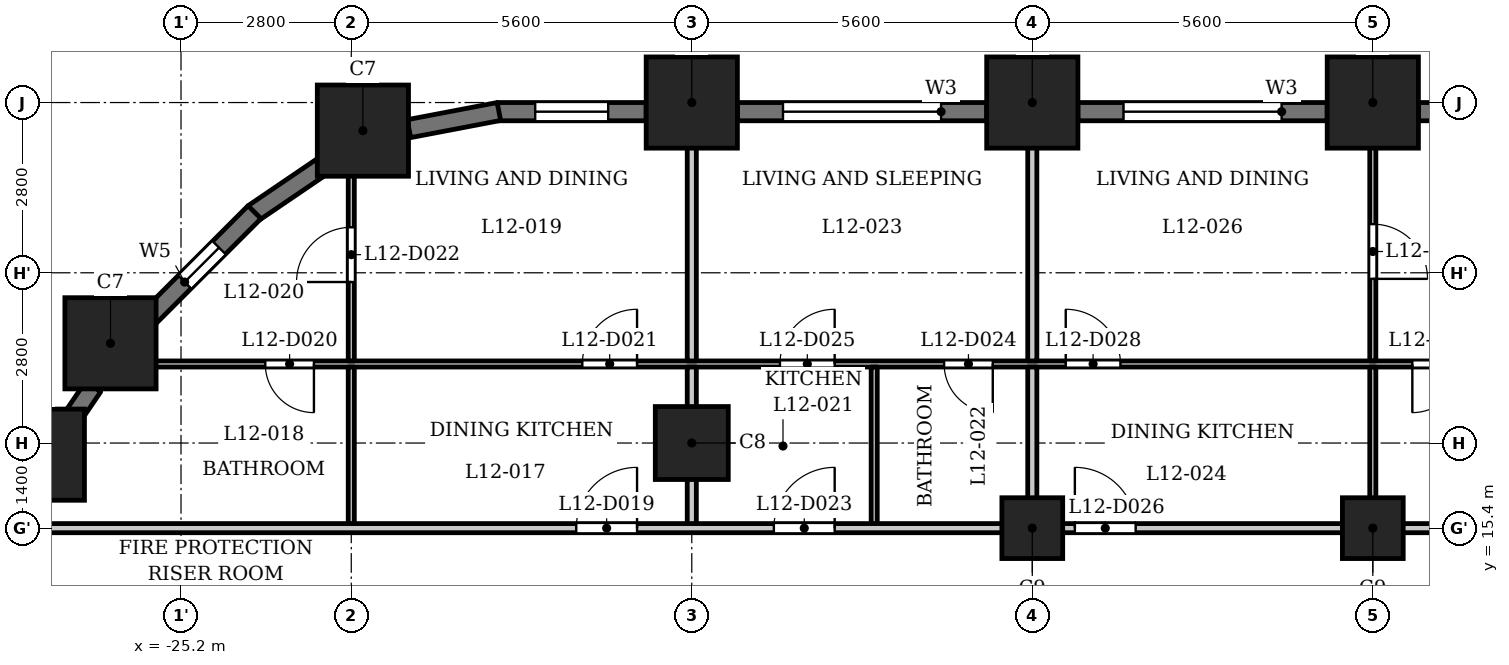
"""IFC4 building model, lengths in metres.
Left out: names, types, materials, properties, quantities, classifications, styles, units other than length and angle.
Written with IfcOpenShell. Run it as: python <this file> out.ifc"""

import sys

from ifc_helpers import new_model, si_unit, direction, frame, frame_2d, origin, origin_2d, place, context, subcontext, project, spatial, rectangle, extrude, element, fill, save


model = new_model("IFC4")
c1 = context("Model", 3, precision=1e-05, world=origin(), true_north=direction((0.0, 1.0)))
c2 = subcontext(c1, "Body", "Model", "MODEL_VIEW")
j1 = project(units=[si_unit("LENGTHUNIT", "METRE"), si_unit("PLANEANGLEUNIT", "RADIAN")], contexts=[c1])
p1 = place(None, origin())
s1 = spatial("IfcSite", under=j1, at=p1, CompositionType="ELEMENT")
p2 = place(p1, origin())
s2 = spatial("IfcBuilding", under=s1, at=p2, CompositionType="ELEMENT")
p3 = place(p2, frame((0.0, 0.0, 51.5)))
s3 = spatial("IfcBuildingStorey", under=s2, at=p3, CompositionType="ELEMENT", Elevation=51.5)
for number, where, z_axis, x_axis in (
    (1, (-5.6, 22.4, 0.0), (0.0, 0.0, 1.0), (1.0, 0.0, 0.0)),
    (2, (-11.2, 22.4, 0.0), (0.0, 0.0, 1.0), (1.0, 0.0, 0.0)),
    (3, (-16.8, 22.4, 0.0), (0.0, 0.0, 1.0), (1.0, 0.0, 0.0)),
    (4, (-22.209, 21.938, 0.0), (0.0, 0.0, 1.0), (1.0, 0.0, 0.0)),
    (5, (-26.36, 18.44, 0.0), (0.0, 0.0, 1.0), (1.0, 0.0, 0.0)),
    (6, (-27.538, 16.609, 0.0), (0.0, 0.0, 1.0), (1.0, 0.0, 0.0)),
):
    element("IfcColumn", number, at=place(p3, frame(where, z_axis=z_axis, x_axis=x_axis)), inside=s3, PredefinedType="COLUMN", context=c2, shape_type="SweptSolid", body=[
        extrude(rectangle(XDim=1.5, YDim=1.5, at=origin_2d()), origin(), (0.0, 0.0, 1.0), 3.5),
    ])
p4 = place(p3, frame((-16.8, 16.8, 0.0), z_axis=(0.0, 0.0, 1.0), x_axis=(1.0, 0.0, 0.0)))
e7 = element("IfcColumn", 7, at=p4, inside=s3, PredefinedType="COLUMN", context=c2, shape_type="SweptSolid", body=[
    extrude(rectangle(XDim=1.2, YDim=1.2, at=origin_2d()), origin(), (0.0, 0.0, 1.0), 3.5),
])
for number, where, z_axis, x_axis in (
    (8, (-11.2, 15.4, 0.0), (0.0, 0.0, 1.0), (1.0, 0.0, 0.0)),
    (9, (-5.6, 15.4, 0.0), (0.0, 0.0, 1.0), (1.0, 0.0, 0.0)),
):
    element("IfcColumn", number, at=place(p3, frame(where, z_axis=z_axis, x_axis=x_axis)), inside=s3, PredefinedType="COLUMN", context=c2, shape_type="SweptSolid", body=[
        extrude(rectangle(XDim=1.0, YDim=1.0, at=origin_2d()), origin(), (0.0, 0.0, 1.0), 3.5),
    ])
p5 = place(p3, frame((-0.75, 22.25, 0.0), z_axis=(0.0, 0.0, 1.0), x_axis=(-1.0, 0.0, 0.0)))
e10 = element("IfcWall", 10, at=p5, inside=s3, PredefinedType="SOLIDWALL", context=c2, shape_type="SweptSolid", body=[
    extrude(rectangle(XDim=4.1, YDim=0.3, at=frame_2d((2.05, 0.0))), origin(), (0.0, 0.0, 1.0), 2.35),
])
p6 = place(p5, frame((0.25, 0.0, 1.2)))
e11 = element("IfcOpeningElement", 11, at=p6, cuts=e10, PredefinedType="OPENING", context=c2, shape_type="SweptSolid", body=[
    extrude(rectangle(XDim=3.6, YDim=0.95, at=frame_2d((1.8, 0.475))), frame((0.0, 0.16, 0.0), z_axis=(0.0, -1.0, 0.0), x_axis=(1.0, 0.0, 0.0)), (0.0, 0.0, 1.0), 0.32),
])
p7 = place(p3, frame((-6.35, 22.25, 0.0), z_axis=(0.0, 0.0, 1.0), x_axis=(-1.0, 0.0, 0.0)))
e12 = element("IfcWall", 12, at=p7, inside=s3, PredefinedType="SOLIDWALL", context=c2, shape_type="SweptSolid", body=[
    extrude(rectangle(XDim=4.1, YDim=0.3, at=frame_2d((2.05, 0.0))), origin(), (0.0, 0.0, 1.0), 2.35),
])
p8 = place(p7, frame((0.75, 0.0, 0.9)))
e13 = element("IfcOpeningElement", 13, at=p8, cuts=e12, PredefinedType="OPENING", context=c2, shape_type="SweptSolid", body=[
    extrude(rectangle(XDim=2.6, YDim=1.25, at=frame_2d((1.3, 0.625))), frame((0.0, 0.16, 0.0), z_axis=(0.0, -1.0, 0.0), x_axis=(1.0, 0.0, 0.0)), (0.0, 0.0, 1.0), 0.32),
])
p9 = place(p3, frame((-11.95, 22.25, 0.0), z_axis=(0.0, 0.0, 1.0), x_axis=(-1.0, 0.0, 0.0)))
e14 = element("IfcWall", 14, at=p9, inside=s3, PredefinedType="SOLIDWALL", context=c2, shape_type="SweptSolid", body=[
    extrude(rectangle(XDim=4.1, YDim=0.3, at=frame_2d((2.05, 0.0))), origin(), (0.0, 0.0, 1.0), 2.35),
])
p10 = place(p9, frame((0.75, 0.0, 0.9)))
e15 = element("IfcOpeningElement", 15, at=p10, cuts=e14, PredefinedType="OPENING", context=c2, shape_type="SweptSolid", body=[
    extrude(rectangle(XDim=2.6, YDim=1.25, at=frame_2d((1.3, 0.625))), frame((0.0, 0.16, 0.0), z_axis=(0.0, -1.0, 0.0), x_axis=(1.0, 0.0, 0.0)), (0.0, 0.0, 1.0), 0.32),
])
p11 = place(p3, frame((-17.55, 22.25, 0.0), z_axis=(0.0, 0.0, 1.0), x_axis=(-1.0, 0.0, 0.0)))
e16 = element("IfcWall", 16, at=p11, inside=s3, PredefinedType="SOLIDWALL", context=c2, shape_type="SweptSolid", body=[
    extrude(rectangle(XDim=2.45, YDim=0.3, at=frame_2d((1.225, 0.0))), origin(), (0.0, 0.0, 1.0), 2.35),
])
p12 = place(p11, frame((0.625, 0.0, 0.6)))
e17 = element("IfcOpeningElement", 17, at=p12, cuts=e16, PredefinedType="OPENING", context=c2, shape_type="SweptSolid", body=[
    extrude(rectangle(XDim=1.2, YDim=1.55, at=frame_2d((0.6, 0.775))), frame((0.0, 0.16, 0.0), z_axis=(0.0, -1.0, 0.0), x_axis=(1.0, 0.0, 0.0)), (0.0, 0.0, 1.0), 0.32),
])
for number, where, z_axis, x_axis in (
    (18, (-19.972, 22.253, 0.0), (0.0, 0.0, 1.0), (-0.982, -0.187, 0.0)),
    (19, (-22.767, 21.426, 0.0), (0.0, 0.0, 1.0), (-0.827, -0.562, 0.0)),
):
    element("IfcWall", number, at=place(p3, frame(where, z_axis=z_axis, x_axis=x_axis)), inside=s3, PredefinedType="SOLIDWALL", context=c2, shape_type="SweptSolid", body=[
        extrude(rectangle(XDim=1.506, YDim=0.3, at=frame_2d((0.753, 0.0))), origin(), (0.0, 0.0, 1.0), 2.35),
    ])
p13 = place(p3, frame((-23.991, 20.597, 0.0), z_axis=(0.0, 0.0, 1.0), x_axis=(-0.707106781187, -0.707106781187, 0.0)))
e20 = element("IfcWall", 20, at=p13, inside=s3, PredefinedType="SOLIDWALL", context=c2, shape_type="SweptSolid", body=[
    extrude(rectangle(XDim=2.45, YDim=0.3, at=frame_2d((1.225, 0.0))), origin(), (0.0, 0.0, 1.0), 2.35),
])
p14 = place(p13, frame((0.825, 0.0, 0.6)))
e21 = element("IfcOpeningElement", 21, at=p14, cuts=e20, PredefinedType="OPENING", context=c2, shape_type="SweptSolid", body=[
    extrude(rectangle(XDim=0.8, YDim=1.55, at=frame_2d((0.4, 0.775))), frame((0.0, 0.16, 0.0), z_axis=(0.0, -1.0, 0.0), x_axis=(1.0, 0.0, 0.0)), (0.0, 0.0, 1.0), 0.32),
])
p15 = place(p3, frame((-26.645, 17.727, 0.0), z_axis=(0.0, 0.0, 1.0), x_axis=(-0.562083182981, -0.827080706709, 0.0)))
e22 = element("IfcWall", 22, at=p15, inside=s3, PredefinedType="SOLIDWALL", context=c2, shape_type="SweptSolid", body=[
    extrude(rectangle(XDim=0.677, YDim=0.3, at=frame_2d((0.339, 0.0))), origin(), (0.0, 0.0, 1.0), 3.2),
])
p16 = place(p3, frame((-27.484, 15.4, 0.0), z_axis=(0.0, 0.0, 1.0), x_axis=(1.0, 0.0, 0.0)))
e23 = element("IfcWall", 23, at=p16, inside=s3, PredefinedType="PARTITIONING", context=c2, shape_type="SweptSolid", body=[
    extrude(rectangle(XDim=54.968, YDim=0.15, at=frame_2d((27.484, 0.0))), origin(), (0.0, 0.0, 1.0), 3.2),
])
p17 = place(p16, frame((8.784, 0.0, 0.0)))
e24 = element("IfcOpeningElement", 24, at=p17, cuts=e23, PredefinedType="OPENING", context=c2, shape_type="SweptSolid", body=[
    extrude(rectangle(XDim=1.0, YDim=2.1, at=frame_2d((0.5, 1.05))), frame((0.0, 0.085, 0.0), z_axis=(0.0, -1.0, 0.0), x_axis=(1.0, 0.0, 0.0)), (0.0, 0.0, 1.0), 0.17),
])
p18 = place(p16, frame((12.034, 0.0, 0.0)))
e25 = element("IfcOpeningElement", 25, at=p18, cuts=e23, PredefinedType="OPENING", context=c2, shape_type="SweptSolid", body=[
    extrude(rectangle(XDim=1.0, YDim=2.1, at=frame_2d((0.5, 1.05))), frame((0.0, 0.085, 0.0), z_axis=(0.0, -1.0, 0.0), x_axis=(1.0, 0.0, 0.0)), (0.0, 0.0, 1.0), 0.17),
])
p19 = place(p16, frame((16.984, 0.0, 0.0)))
e26 = element("IfcOpeningElement", 26, at=p19, cuts=e23, PredefinedType="OPENING", context=c2, shape_type="SweptSolid", body=[
    extrude(rectangle(XDim=1.0, YDim=2.1, at=frame_2d((0.5, 1.05))), frame((0.0, 0.085, 0.0), z_axis=(0.0, -1.0, 0.0), x_axis=(1.0, 0.0, 0.0)), (0.0, 0.0, 1.0), 0.17),
])
p20 = place(p16, frame((28.184, 0.0, 0.0)))
e27 = element("IfcOpeningElement", 27, at=p20, cuts=e23, PredefinedType="OPENING", context=c2, shape_type="SweptSolid", body=[
    extrude(rectangle(XDim=1.0, YDim=2.1, at=frame_2d((0.5, 1.05))), frame((0.0, 0.085, 0.0), z_axis=(0.0, -1.0, 0.0), x_axis=(1.0, 0.0, 0.0)), (0.0, 0.0, 1.0), 0.17),
])
p21 = place(p16, frame((48.234, 0.0, 0.0)))
e28 = element("IfcOpeningElement", 28, at=p21, cuts=e23, PredefinedType="OPENING", context=c2, shape_type="SweptSolid", body=[
    extrude(rectangle(XDim=1.0, YDim=2.1, at=frame_2d((0.5, 1.05))), frame((0.0, 0.085, 0.0), z_axis=(0.0, -1.0, 0.0), x_axis=(1.0, 0.0, 0.0)), (0.0, 0.0, 1.0), 0.17),
])
p22 = place(p3, frame((-26.44, 18.1, 0.0), z_axis=(0.0, 0.0, 1.0), x_axis=(1.0, 0.0, 0.0)))
e29 = element("IfcWall", 29, at=p22, inside=s3, PredefinedType="PARTITIONING", context=c2, shape_type="SweptSolid", body=[
    extrude(rectangle(XDim=52.63, YDim=0.1, at=frame_2d((26.315, 0.0))), origin(), (0.0, 0.0, 1.0), 3.2),
])
p23 = place(p22, frame((2.626, 0.0, 0.0)))
e30 = element("IfcOpeningElement", 30, at=p23, cuts=e29, PredefinedType="OPENING", context=c2, shape_type="SweptSolid", body=[
    extrude(rectangle(XDim=0.8, YDim=2.1, at=frame_2d((0.4, 1.05))), frame((0.0, 0.06, 0.0), z_axis=(0.0, -1.0, 0.0), x_axis=(1.0, 0.0, 0.0)), (0.0, 0.0, 1.0), 0.12),
])
p24 = place(p22, frame((7.84, 0.0, 0.0)))
e31 = element("IfcOpeningElement", 31, at=p24, cuts=e29, PredefinedType="OPENING", context=c2, shape_type="SweptSolid", body=[
    extrude(rectangle(XDim=0.9, YDim=2.1, at=frame_2d((0.45, 1.05))), frame((0.0, 0.06, 0.0), z_axis=(0.0, -1.0, 0.0), x_axis=(1.0, 0.0, 0.0)), (0.0, 0.0, 1.0), 0.12),
])
p25 = place(p22, frame((13.79, 0.0, 0.0)))
e32 = element("IfcOpeningElement", 32, at=p25, cuts=e29, PredefinedType="OPENING", context=c2, shape_type="SweptSolid", body=[
    extrude(rectangle(XDim=0.8, YDim=2.1, at=frame_2d((0.4, 1.05))), frame((0.0, 0.06, 0.0), z_axis=(0.0, -1.0, 0.0), x_axis=(1.0, 0.0, 0.0)), (0.0, 0.0, 1.0), 0.12),
])
p26 = place(p22, frame((11.09, 0.0, 0.0)))
e33 = element("IfcOpeningElement", 33, at=p26, cuts=e29, PredefinedType="OPENING", context=c2, shape_type="SweptSolid", body=[
    extrude(rectangle(XDim=0.9, YDim=2.1, at=frame_2d((0.45, 1.05))), frame((0.0, 0.06, 0.0), z_axis=(0.0, -1.0, 0.0), x_axis=(1.0, 0.0, 0.0)), (0.0, 0.0, 1.0), 0.12),
])
p27 = place(p22, frame((21.49, 0.0, 0.0)))
e34 = element("IfcOpeningElement", 34, at=p27, cuts=e29, PredefinedType="OPENING", context=c2, shape_type="SweptSolid", body=[
    extrude(rectangle(XDim=0.8, YDim=2.1, at=frame_2d((0.4, 1.05))), frame((0.0, 0.06, 0.0), z_axis=(0.0, -1.0, 0.0), x_axis=(1.0, 0.0, 0.0)), (0.0, 0.0, 1.0), 0.12),
])
p28 = place(p22, frame((15.79, 0.0, 0.0)))
e35 = element("IfcOpeningElement", 35, at=p28, cuts=e29, PredefinedType="OPENING", context=c2, shape_type="SweptSolid", body=[
    extrude(rectangle(XDim=0.9, YDim=2.1, at=frame_2d((0.45, 1.05))), frame((0.0, 0.06, 0.0), z_axis=(0.0, -1.0, 0.0), x_axis=(1.0, 0.0, 0.0)), (0.0, 0.0, 1.0), 0.12),
])
p29 = place(p22, frame((27.49, 0.0, 0.0)))
e36 = element("IfcOpeningElement", 36, at=p29, cuts=e29, PredefinedType="OPENING", context=c2, shape_type="SweptSolid", body=[
    extrude(rectangle(XDim=0.9, YDim=2.1, at=frame_2d((0.45, 1.05))), frame((0.0, 0.06, 0.0), z_axis=(0.0, -1.0, 0.0), x_axis=(1.0, 0.0, 0.0)), (0.0, 0.0, 1.0), 0.12),
])
p30 = place(p22, frame((29.74, 0.0, 0.0)))
e37 = element("IfcOpeningElement", 37, at=p30, cuts=e29, PredefinedType="OPENING", context=c2, shape_type="SweptSolid", body=[
    extrude(rectangle(XDim=0.9, YDim=2.1, at=frame_2d((0.45, 1.05))), frame((0.0, 0.06, 0.0), z_axis=(0.0, -1.0, 0.0), x_axis=(1.0, 0.0, 0.0)), (0.0, 0.0, 1.0), 0.12),
])
p31 = place(p22, frame((35.84, 0.0, 0.0)))
e38 = element("IfcOpeningElement", 38, at=p31, cuts=e29, PredefinedType="OPENING", context=c2, shape_type="SweptSolid", body=[
    extrude(rectangle(XDim=0.9, YDim=2.1, at=frame_2d((0.45, 1.05))), frame((0.0, 0.06, 0.0), z_axis=(0.0, -1.0, 0.0), x_axis=(1.0, 0.0, 0.0)), (0.0, 0.0, 1.0), 0.12),
])
p32 = place(p22, frame((50.74, 0.0, 0.0)))
e39 = element("IfcOpeningElement", 39, at=p32, cuts=e29, PredefinedType="OPENING", context=c2, shape_type="SweptSolid", body=[
    extrude(rectangle(XDim=0.8, YDim=2.1, at=frame_2d((0.4, 1.05))), frame((0.0, 0.06, 0.0), z_axis=(0.0, -1.0, 0.0), x_axis=(1.0, 0.0, 0.0)), (0.0, 0.0, 1.0), 0.12),
])
p33 = place(p22, frame((47.29, 0.0, 0.0)))
e40 = element("IfcOpeningElement", 40, at=p33, cuts=e29, PredefinedType="OPENING", context=c2, shape_type="SweptSolid", body=[
    extrude(rectangle(XDim=0.9, YDim=2.1, at=frame_2d((0.45, 1.05))), frame((0.0, 0.06, 0.0), z_axis=(0.0, -1.0, 0.0), x_axis=(1.0, 0.0, 0.0)), (0.0, 0.0, 1.0), 0.12),
])
p34 = place(p3, frame((-22.4, 15.475, 0.0), z_axis=(0.0, 0.0, 1.0), x_axis=(0.0, 1.0, 0.0)))
e41 = element("IfcWall", 41, at=p34, inside=s3, PredefinedType="PARTITIONING", context=c2, shape_type="SweptSolid", body=[
    extrude(rectangle(XDim=2.575, YDim=0.1, at=frame_2d((1.288, 0.0))), origin(), (0.0, 0.0, 1.0), 3.2),
])
p35 = place(p3, frame((-22.4, 18.15, 0.0), z_axis=(0.0, 0.0, 1.0), x_axis=(0.0, 1.0, 0.0)))
e42 = element("IfcWall", 42, at=p35, inside=s3, PredefinedType="PARTITIONING", context=c2, shape_type="SweptSolid", body=[
    extrude(rectangle(XDim=3.57, YDim=0.1, at=frame_2d((1.785, 0.0))), origin(), (0.0, 0.0, 1.0), 3.2),
])
p36 = place(p35, frame((1.298, 0.0, 0.0)))
e43 = element("IfcOpeningElement", 43, at=p36, cuts=e42, PredefinedType="OPENING", context=c2, shape_type="SweptSolid", body=[
    extrude(rectangle(XDim=0.9, YDim=2.1, at=frame_2d((0.45, 1.05))), frame((0.0, 0.06, 0.0), z_axis=(0.0, -1.0, 0.0), x_axis=(1.0, 0.0, 0.0)), (0.0, 0.0, 1.0), 0.12),
])
p37 = place(p3, frame((-16.8, 15.475, 0.0), z_axis=(0.0, 0.0, 1.0), x_axis=(0.0, 1.0, 0.0)))
e44 = element("IfcWall", 44, at=p37, inside=s3, PredefinedType="PARTITIONING", context=c2, shape_type="SweptSolid", body=[
    extrude(rectangle(XDim=2.575, YDim=0.15, at=frame_2d((1.288, 0.0))), origin(), (0.0, 0.0, 1.0), 3.2),
])
p38 = place(p3, frame((-16.8, 18.15, 0.0), z_axis=(0.0, 0.0, 1.0), x_axis=(0.0, 1.0, 0.0)))
e45 = element("IfcWall", 45, at=p38, inside=s3, PredefinedType="PARTITIONING", context=c2, shape_type="SweptSolid", body=[
    extrude(rectangle(XDim=4.98, YDim=0.15, at=frame_2d((2.49, 0.0))), origin(), (0.0, 0.0, 1.0), 3.2),
])
p39 = place(p3, frame((-13.8, 15.475, 0.0), z_axis=(0.0, 0.0, 1.0), x_axis=(0.0, 1.0, 0.0)))
e46 = element("IfcWall", 46, at=p39, inside=s3, PredefinedType="PARTITIONING", context=c2, shape_type="SweptSolid", body=[
    extrude(rectangle(XDim=2.575, YDim=0.1, at=frame_2d((1.288, 0.0))), origin(), (0.0, 0.0, 1.0), 3.2),
])
p40 = place(p3, frame((-11.2, 15.475, 0.0), z_axis=(0.0, 0.0, 1.0), x_axis=(0.0, 1.0, 0.0)))
e47 = element("IfcWall", 47, at=p40, inside=s3, PredefinedType="PARTITIONING", context=c2, shape_type="SweptSolid", body=[
    extrude(rectangle(XDim=2.575, YDim=0.15, at=frame_2d((1.288, 0.0))), origin(), (0.0, 0.0, 1.0), 3.2),
])
p41 = place(p3, frame((-11.2, 18.15, 0.0), z_axis=(0.0, 0.0, 1.0), x_axis=(0.0, 1.0, 0.0)))
e48 = element("IfcWall", 48, at=p41, inside=s3, PredefinedType="PARTITIONING", context=c2, shape_type="SweptSolid", body=[
    extrude(rectangle(XDim=4.98, YDim=0.15, at=frame_2d((2.49, 0.0))), origin(), (0.0, 0.0, 1.0), 3.2),
])
p42 = place(p3, frame((-5.6, 15.475, 0.0), z_axis=(0.0, 0.0, 1.0), x_axis=(0.0, 1.0, 0.0)))
e49 = element("IfcWall", 49, at=p42, inside=s3, PredefinedType="PARTITIONING", context=c2, shape_type="SweptSolid", body=[
    extrude(rectangle(XDim=2.575, YDim=0.1, at=frame_2d((1.288, 0.0))), origin(), (0.0, 0.0, 1.0), 3.2),
])
p43 = place(p3, frame((-5.6, 18.15, 0.0), z_axis=(0.0, 0.0, 1.0), x_axis=(0.0, 1.0, 0.0)))
e50 = element("IfcWall", 50, at=p43, inside=s3, PredefinedType="PARTITIONING", context=c2, shape_type="SweptSolid", body=[
    extrude(rectangle(XDim=4.98, YDim=0.1, at=frame_2d((2.49, 0.0))), origin(), (0.0, 0.0, 1.0), 3.2),
])
p44 = place(p43, frame((1.35, 0.0, 0.0)))
e51 = element("IfcOpeningElement", 51, at=p44, cuts=e50, PredefinedType="OPENING", context=c2, shape_type="SweptSolid", body=[
    extrude(rectangle(XDim=0.9, YDim=2.1, at=frame_2d((0.45, 1.05))), frame((0.0, 0.06, 0.0), z_axis=(0.0, -1.0, 0.0), x_axis=(1.0, 0.0, 0.0)), (0.0, 0.0, 1.0), 0.12),
])
p45 = place(p17, origin())
e52 = element("IfcDoor", 52, at=p45, inside=s3, OperationType="SINGLE_SWING_LEFT", PredefinedType="DOOR", context=c2, shape_type="SweptSolid", body=[
    extrude(rectangle(XDim=1.0, YDim=2.1, at=frame_2d((0.5, 1.05))), frame((0.0, 0.025, 0.0), z_axis=(0.0, -1.0, 0.0), x_axis=(1.0, 0.0, 0.0)), (0.0, 0.0, 1.0), 0.05),
])
fill(e24, e52)
p46 = place(p23, origin())
e53 = element("IfcDoor", 53, at=p46, inside=s3, OperationType="SINGLE_SWING_RIGHT", PredefinedType="DOOR", context=c2, shape_type="SweptSolid", body=[
    extrude(rectangle(XDim=0.8, YDim=2.1, at=frame_2d((0.4, 1.05))), frame((0.0, 0.025, 0.0), z_axis=(0.0, -1.0, 0.0), x_axis=(1.0, 0.0, 0.0)), (0.0, 0.0, 1.0), 0.05),
])
fill(e30, e53)
p47 = place(p24, origin())
e54 = element("IfcDoor", 54, at=p47, inside=s3, OperationType="SINGLE_SWING_LEFT", PredefinedType="DOOR", context=c2, shape_type="SweptSolid", body=[
    extrude(rectangle(XDim=0.9, YDim=2.1, at=frame_2d((0.45, 1.05))), frame((0.0, 0.025, 0.0), z_axis=(0.0, -1.0, 0.0), x_axis=(1.0, 0.0, 0.0)), (0.0, 0.0, 1.0), 0.05),
])
fill(e31, e54)
p48 = place(p36, origin())
e55 = element("IfcDoor", 55, at=p48, inside=s3, OperationType="SINGLE_SWING_RIGHT", PredefinedType="DOOR", context=c2, shape_type="SweptSolid", body=[
    extrude(rectangle(XDim=0.9, YDim=2.1, at=frame_2d((0.45, 1.05))), frame((0.0, 0.025, 0.0), z_axis=(0.0, -1.0, 0.0), x_axis=(1.0, 0.0, 0.0)), (0.0, 0.0, 1.0), 0.05),
])
fill(e43, e55)
p49 = place(p18, origin())
e56 = element("IfcDoor", 56, at=p49, inside=s3, OperationType="SINGLE_SWING_LEFT", PredefinedType="DOOR", context=c2, shape_type="SweptSolid", body=[
    extrude(rectangle(XDim=1.0, YDim=2.1, at=frame_2d((0.5, 1.05))), frame((0.0, 0.025, 0.0), z_axis=(0.0, -1.0, 0.0), x_axis=(1.0, 0.0, 0.0)), (0.0, 0.0, 1.0), 0.05),
])
fill(e25, e56)
p50 = place(p25, origin())
e57 = element("IfcDoor", 57, at=p50, inside=s3, OperationType="SINGLE_SWING_RIGHT", PredefinedType="DOOR", context=c2, shape_type="SweptSolid", body=[
    extrude(rectangle(XDim=0.8, YDim=2.1, at=frame_2d((0.4, 1.05))), frame((0.0, 0.025, 0.0), z_axis=(0.0, -1.0, 0.0), x_axis=(1.0, 0.0, 0.0)), (0.0, 0.0, 1.0), 0.05),
])
fill(e32, e57)
p51 = place(p26, origin())
e58 = element("IfcDoor", 58, at=p51, inside=s3, OperationType="SINGLE_SWING_LEFT", PredefinedType="DOOR", context=c2, shape_type="SweptSolid", body=[
    extrude(rectangle(XDim=0.9, YDim=2.1, at=frame_2d((0.45, 1.05))), frame((0.0, 0.025, 0.0), z_axis=(0.0, -1.0, 0.0), x_axis=(1.0, 0.0, 0.0)), (0.0, 0.0, 1.0), 0.05),
])
fill(e33, e58)
p52 = place(p19, origin())
e59 = element("IfcDoor", 59, at=p52, inside=s3, OperationType="SINGLE_SWING_RIGHT", PredefinedType="DOOR", context=c2, shape_type="SweptSolid", body=[
    extrude(rectangle(XDim=1.0, YDim=2.1, at=frame_2d((0.5, 1.05))), frame((0.0, 0.025, 0.0), z_axis=(0.0, -1.0, 0.0), x_axis=(1.0, 0.0, 0.0)), (0.0, 0.0, 1.0), 0.05),
])
fill(e26, e59)
p53 = place(p27, origin())
e60 = element("IfcDoor", 60, at=p53, inside=s3, OperationType="SINGLE_SWING_LEFT", PredefinedType="DOOR", context=c2, shape_type="SweptSolid", body=[
    extrude(rectangle(XDim=0.8, YDim=2.1, at=frame_2d((0.4, 1.05))), frame((0.0, 0.025, 0.0), z_axis=(0.0, -1.0, 0.0), x_axis=(1.0, 0.0, 0.0)), (0.0, 0.0, 1.0), 0.05),
])
fill(e34, e60)
p54 = place(p28, origin())
e61 = element("IfcDoor", 61, at=p54, inside=s3, OperationType="SINGLE_SWING_RIGHT", PredefinedType="DOOR", context=c2, shape_type="SweptSolid", body=[
    extrude(rectangle(XDim=0.9, YDim=2.1, at=frame_2d((0.45, 1.05))), frame((0.0, 0.025, 0.0), z_axis=(0.0, -1.0, 0.0), x_axis=(1.0, 0.0, 0.0)), (0.0, 0.0, 1.0), 0.05),
])
fill(e35, e61)
p55 = place(p44, origin())
e62 = element("IfcDoor", 62, at=p55, inside=s3, OperationType="SINGLE_SWING_LEFT", PredefinedType="DOOR", context=c2, shape_type="SweptSolid", body=[
    extrude(rectangle(XDim=0.9, YDim=2.1, at=frame_2d((0.45, 1.05))), frame((0.0, 0.025, 0.0), z_axis=(0.0, -1.0, 0.0), x_axis=(1.0, 0.0, 0.0)), (0.0, 0.0, 1.0), 0.05),
])
fill(e51, e62)
p56 = place(p8, origin())
e63 = element("IfcWindow", 63, at=p56, inside=s3, PartitioningType="SINGLE_PANEL", PredefinedType="WINDOW", context=c2, shape_type="SweptSolid", body=[
    extrude(rectangle(XDim=2.6, YDim=1.25, at=frame_2d((1.3, 0.625))), frame((0.0, 0.03, 0.0), z_axis=(0.0, -1.0, 0.0), x_axis=(1.0, 0.0, 0.0)), (0.0, 0.0, 1.0), 0.06),
])
fill(e13, e63)
p57 = place(p10, origin())
e64 = element("IfcWindow", 64, at=p57, inside=s3, PartitioningType="SINGLE_PANEL", PredefinedType="WINDOW", context=c2, shape_type="SweptSolid", body=[
    extrude(rectangle(XDim=2.6, YDim=1.25, at=frame_2d((1.3, 0.625))), frame((0.0, 0.03, 0.0), z_axis=(0.0, -1.0, 0.0), x_axis=(1.0, 0.0, 0.0)), (0.0, 0.0, 1.0), 0.06),
])
fill(e15, e64)
p58 = place(p12, origin())
e65 = element("IfcWindow", 65, at=p58, inside=s3, PartitioningType="SINGLE_PANEL", PredefinedType="WINDOW", context=c2, shape_type="SweptSolid", body=[
    extrude(rectangle(XDim=1.2, YDim=1.55, at=frame_2d((0.6, 0.775))), frame((0.0, 0.03, 0.0), z_axis=(0.0, -1.0, 0.0), x_axis=(1.0, 0.0, 0.0)), (0.0, 0.0, 1.0), 0.06),
])
fill(e17, e65)
p59 = place(p14, origin())
e66 = element("IfcWindow", 66, at=p59, inside=s3, PartitioningType="SINGLE_PANEL", PredefinedType="WINDOW", context=c2, shape_type="SweptSolid", body=[
    extrude(rectangle(XDim=0.8, YDim=1.55, at=frame_2d((0.4, 0.775))), frame((0.0, 0.03, 0.0), z_axis=(0.0, -1.0, 0.0), x_axis=(1.0, 0.0, 0.0)), (0.0, 0.0, 1.0), 0.06),
])
fill(e21, e66)
save(model, sys.argv[1])
